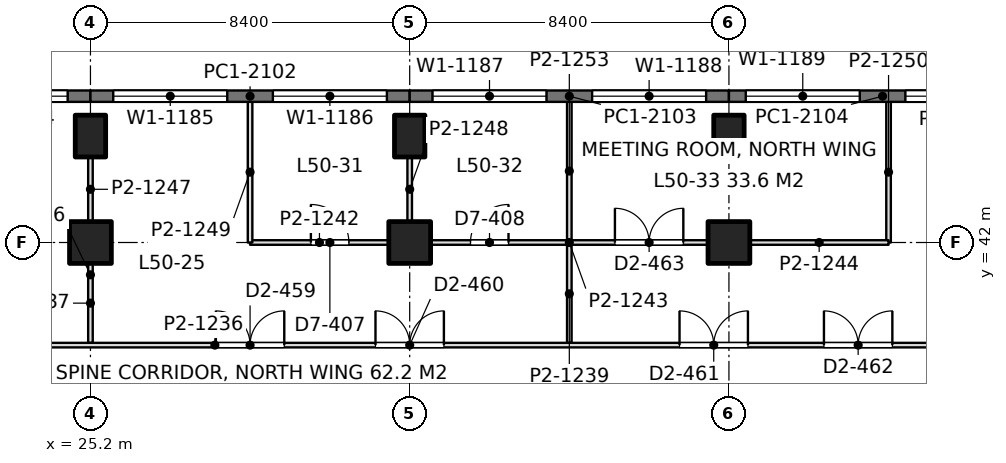
"""IFC4 building model, lengths in metres.
Left out: names, types, materials, properties, quantities, classifications, styles, units other than length and angle.
Written with IfcOpenShell. Run it as: python <this file> out.ifc"""

import sys

from ifc_helpers import new_model, si_unit, direction, frame, frame_2d, origin, origin_2d, place, context, subcontext, project, spatial, rectangle, extrude, element, fill, save


model = new_model("IFC4")
c1 = context("Model", 3, precision=1e-05, world=origin(), true_north=direction((0.0, 1.0)))
c2 = subcontext(c1, "Body", "Model", "MODEL_VIEW")
j1 = project(units=[si_unit("LENGTHUNIT", "METRE"), si_unit("PLANEANGLEUNIT", "RADIAN")], contexts=[c1])
p1 = place(None, origin())
s1 = spatial("IfcSite", under=j1, at=p1, CompositionType="ELEMENT")
p2 = place(p1, origin())
s2 = spatial("IfcBuilding", under=s1, at=p2, CompositionType="ELEMENT")
p3 = place(p2, frame((0.0, 0.0, 219.6)))
s3 = spatial("IfcBuildingStorey", under=s2, at=p3, CompositionType="ELEMENT", Elevation=219.6)
p4 = place(p3, frame((25.2, 42.0, 0.0), z_axis=(0.0, 0.0, 1.0), x_axis=(1.0, 0.0, 0.0)))
e1 = element("IfcColumn", 1, at=p4, inside=s3, PredefinedType="COLUMN", context=c2, shape_type="SweptSolid", body=[
    extrude(rectangle(XDim=1.1, YDim=1.1, at=origin_2d()), origin(), (0.0, 0.0, 1.0), 4.2),
])
p5 = place(p3, frame((25.2, 44.8, 0.0), z_axis=(0.0, 0.0, 1.0), x_axis=(1.0, 0.0, 0.0)))
e2 = element("IfcColumn", 2, at=p5, inside=s3, PredefinedType="COLUMN", context=c2, shape_type="SweptSolid", body=[
    extrude(rectangle(XDim=0.8, YDim=1.1, at=origin_2d()), origin(), (0.0, 0.0, 1.0), 4.2),
])
p6 = place(p3, frame((33.6, 42.0, 0.0), z_axis=(0.0, 0.0, 1.0), x_axis=(1.0, 0.0, 0.0)))
e3 = element("IfcColumn", 3, at=p6, inside=s3, PredefinedType="COLUMN", context=c2, shape_type="SweptSolid", body=[
    extrude(rectangle(XDim=1.1, YDim=1.1, at=origin_2d()), origin(), (0.0, 0.0, 1.0), 4.2),
])
p7 = place(p3, frame((33.6, 44.8, 0.0), z_axis=(0.0, 0.0, 1.0), x_axis=(1.0, 0.0, 0.0)))
e4 = element("IfcColumn", 4, at=p7, inside=s3, PredefinedType="COLUMN", context=c2, shape_type="SweptSolid", body=[
    extrude(rectangle(XDim=0.8, YDim=1.1, at=origin_2d()), origin(), (0.0, 0.0, 1.0), 4.2),
])
p8 = place(p3, frame((42.0, 42.0, 0.0), z_axis=(0.0, 0.0, 1.0), x_axis=(1.0, 0.0, 0.0)))
e5 = element("IfcColumn", 5, at=p8, inside=s3, PredefinedType="COLUMN", context=c2, shape_type="SweptSolid", body=[
    extrude(rectangle(XDim=1.1, YDim=1.1, at=origin_2d()), origin(), (0.0, 0.0, 1.0), 4.2),
])
p9 = place(p3, frame((42.0, 44.8, 0.0), z_axis=(0.0, 0.0, 1.0), x_axis=(1.0, 0.0, 0.0)))
e6 = element("IfcColumn", 6, at=p9, inside=s3, PredefinedType="COLUMN", context=c2, shape_type="SweptSolid", body=[
    extrude(rectangle(XDim=0.8, YDim=1.1, at=origin_2d()), origin(), (0.0, 0.0, 1.0), 4.2),
])
p10 = place(p3, frame((16.8, 45.85, 0.0), z_axis=(0.0, 0.0, 1.0), x_axis=(1.0, 0.0, 0.0)))
e7 = element("IfcWall", 7, at=p10, inside=s3, PredefinedType="SOLIDWALL", context=c2, shape_type="SweptSolid", body=[
    extrude(rectangle(XDim=8.4, YDim=0.3, at=frame_2d((4.2, 0.0))), origin(), (0.0, 0.0, 1.0), 4.05),
])
p11 = place(p10, frame((0.6, 0.0, 0.9)))
e8 = element("IfcOpeningElement", 8, at=p11, cuts=e7, PredefinedType="OPENING", context=c2, shape_type="SweptSolid", body=[
    extrude(rectangle(XDim=3.0, YDim=1.9, at=frame_2d((1.5, 0.95))), frame((0.0, 0.16, 0.0), z_axis=(0.0, -1.0, 0.0), x_axis=(1.0, 0.0, 0.0)), (0.0, 0.0, 1.0), 0.32),
])
p12 = place(p10, frame((4.8, 0.0, 0.9)))
e9 = element("IfcOpeningElement", 9, at=p12, cuts=e7, PredefinedType="OPENING", context=c2, shape_type="SweptSolid", body=[
    extrude(rectangle(XDim=3.0, YDim=1.9, at=frame_2d((1.5, 0.95))), frame((0.0, 0.16, 0.0), z_axis=(0.0, -1.0, 0.0), x_axis=(1.0, 0.0, 0.0)), (0.0, 0.0, 1.0), 0.32),
])
p13 = place(p3, frame((25.2, 45.85, 0.0), z_axis=(0.0, 0.0, 1.0), x_axis=(1.0, 0.0, 0.0)))
e10 = element("IfcWall", 10, at=p13, inside=s3, PredefinedType="SOLIDWALL", context=c2, shape_type="SweptSolid", body=[
    extrude(rectangle(XDim=8.4, YDim=0.3, at=frame_2d((4.2, 0.0))), origin(), (0.0, 0.0, 1.0), 4.05),
])
p14 = place(p13, frame((0.6, 0.0, 0.9)))
e11 = element("IfcOpeningElement", 11, at=p14, cuts=e10, PredefinedType="OPENING", context=c2, shape_type="SweptSolid", body=[
    extrude(rectangle(XDim=3.0, YDim=1.9, at=frame_2d((1.5, 0.95))), frame((0.0, 0.16, 0.0), z_axis=(0.0, -1.0, 0.0), x_axis=(1.0, 0.0, 0.0)), (0.0, 0.0, 1.0), 0.32),
])
p15 = place(p13, frame((4.8, 0.0, 0.9)))
e12 = element("IfcOpeningElement", 12, at=p15, cuts=e10, PredefinedType="OPENING", context=c2, shape_type="SweptSolid", body=[
    extrude(rectangle(XDim=3.0, YDim=1.9, at=frame_2d((1.5, 0.95))), frame((0.0, 0.16, 0.0), z_axis=(0.0, -1.0, 0.0), x_axis=(1.0, 0.0, 0.0)), (0.0, 0.0, 1.0), 0.32),
])
p16 = place(p3, frame((33.6, 45.85, 0.0), z_axis=(0.0, 0.0, 1.0), x_axis=(1.0, 0.0, 0.0)))
e13 = element("IfcWall", 13, at=p16, inside=s3, PredefinedType="SOLIDWALL", context=c2, shape_type="SweptSolid", body=[
    extrude(rectangle(XDim=8.4, YDim=0.3, at=frame_2d((4.2, 0.0))), origin(), (0.0, 0.0, 1.0), 4.05),
])
p17 = place(p16, frame((0.6, 0.0, 0.9)))
e14 = element("IfcOpeningElement", 14, at=p17, cuts=e13, PredefinedType="OPENING", context=c2, shape_type="SweptSolid", body=[
    extrude(rectangle(XDim=3.0, YDim=1.9, at=frame_2d((1.5, 0.95))), frame((0.0, 0.16, 0.0), z_axis=(0.0, -1.0, 0.0), x_axis=(1.0, 0.0, 0.0)), (0.0, 0.0, 1.0), 0.32),
])
p18 = place(p16, frame((4.8, 0.0, 0.9)))
e15 = element("IfcOpeningElement", 15, at=p18, cuts=e13, PredefinedType="OPENING", context=c2, shape_type="SweptSolid", body=[
    extrude(rectangle(XDim=3.0, YDim=1.9, at=frame_2d((1.5, 0.95))), frame((0.0, 0.16, 0.0), z_axis=(0.0, -1.0, 0.0), x_axis=(1.0, 0.0, 0.0)), (0.0, 0.0, 1.0), 0.32),
])
p19 = place(p3, frame((42.0, 45.85, 0.0), z_axis=(0.0, 0.0, 1.0), x_axis=(1.0, 0.0, 0.0)))
e16 = element("IfcWall", 16, at=p19, inside=s3, PredefinedType="SOLIDWALL", context=c2, shape_type="SweptSolid", body=[
    extrude(rectangle(XDim=8.085, YDim=0.3, at=frame_2d((4.042, 0.0))), origin(), (0.0, 0.0, 1.0), 4.05),
])
p20 = place(p19, frame((0.443, 0.0, 0.9)))
e17 = element("IfcOpeningElement", 17, at=p20, cuts=e16, PredefinedType="OPENING", context=c2, shape_type="SweptSolid", body=[
    extrude(rectangle(XDim=3.0, YDim=1.9, at=frame_2d((1.5, 0.95))), frame((0.0, 0.16, 0.0), z_axis=(0.0, -1.0, 0.0), x_axis=(1.0, 0.0, 0.0)), (0.0, 0.0, 1.0), 0.32),
])
p21 = place(p19, frame((4.643, 0.0, 0.9)))
e18 = element("IfcOpeningElement", 18, at=p21, cuts=e16, PredefinedType="OPENING", context=c2, shape_type="SweptSolid", body=[
    extrude(rectangle(XDim=3.0, YDim=1.9, at=frame_2d((1.5, 0.95))), frame((0.0, 0.16, 0.0), z_axis=(0.0, -1.0, 0.0), x_axis=(1.0, 0.0, 0.0)), (0.0, 0.0, 1.0), 0.32),
])
p22 = place(p3, frame((29.4, 42.0, 0.0), z_axis=(0.0, 0.0, 1.0), x_axis=(1.0, 0.0, 0.0)))
e19 = element("IfcWall", 19, at=p22, inside=s3, PredefinedType="PARTITIONING", context=c2, shape_type="SweptSolid", body=[
    extrude(rectangle(XDim=3.651, YDim=0.12, at=frame_2d((1.826, 0.0))), origin(), (0.0, 0.0, 1.0), 3.55),
])
p23 = place(p22, frame((1.6, 0.0, 0.0)))
e20 = element("IfcOpeningElement", 20, at=p23, cuts=e19, PredefinedType="OPENING", context=c2, shape_type="SweptSolid", body=[
    extrude(rectangle(XDim=1.0, YDim=2.4, at=frame_2d((0.5, 1.2))), frame((0.0, 0.07, 0.0), z_axis=(0.0, -1.0, 0.0), x_axis=(1.0, 0.0, 0.0)), (0.0, 0.0, 1.0), 0.14),
])
p24 = place(p3, frame((34.149, 42.0, 0.0), z_axis=(0.0, 0.0, 1.0), x_axis=(1.0, 0.0, 0.0)))
e21 = element("IfcWall", 21, at=p24, inside=s3, PredefinedType="PARTITIONING", context=c2, shape_type="SweptSolid", body=[
    extrude(rectangle(XDim=7.302, YDim=0.12, at=frame_2d((3.651, 0.0))), origin(), (0.0, 0.0, 1.0), 3.55),
])
p25 = place(p24, frame((1.051, 0.0, 0.0)))
e22 = element("IfcOpeningElement", 22, at=p25, cuts=e21, PredefinedType="OPENING", context=c2, shape_type="SweptSolid", body=[
    extrude(rectangle(XDim=1.0, YDim=2.4, at=frame_2d((0.5, 1.2))), frame((0.0, 0.07, 0.0), z_axis=(0.0, -1.0, 0.0), x_axis=(1.0, 0.0, 0.0)), (0.0, 0.0, 1.0), 0.14),
])
p26 = place(p24, frame((4.851, 0.0, 0.0)))
e23 = element("IfcOpeningElement", 23, at=p26, cuts=e21, PredefinedType="OPENING", context=c2, shape_type="SweptSolid", body=[
    extrude(rectangle(XDim=1.8, YDim=2.2, at=frame_2d((0.9, 1.1))), frame((0.0, 0.07, 0.0), z_axis=(0.0, -1.0, 0.0), x_axis=(1.0, 0.0, 0.0)), (0.0, 0.0, 1.0), 0.14),
])
p27 = place(p3, frame((42.549, 42.0, 0.0), z_axis=(0.0, 0.0, 1.0), x_axis=(1.0, 0.0, 0.0)))
e24 = element("IfcWall", 24, at=p27, inside=s3, PredefinedType="PARTITIONING", context=c2, shape_type="SweptSolid", body=[
    extrude(rectangle(XDim=3.651, YDim=0.12, at=frame_2d((1.825, 0.0))), origin(), (0.0, 0.0, 1.0), 3.55),
])
p28 = place(p3, frame((29.4, 42.0, 0.0), z_axis=(0.0, 0.0, 1.0), x_axis=(0.0, 1.0, 0.0)))
e25 = element("IfcWall", 25, at=p28, inside=s3, PredefinedType="PARTITIONING", context=c2, shape_type="SweptSolid", body=[
    extrude(rectangle(XDim=3.702, YDim=0.12, at=frame_2d((1.851, 0.0))), origin(), (0.0, 0.0, 1.0), 3.55),
])
p29 = place(p3, frame((33.6, 42.549, 0.0), z_axis=(0.0, 0.0, 1.0), x_axis=(0.0, 1.0, 0.0)))
e26 = element("IfcWall", 26, at=p29, inside=s3, PredefinedType="PARTITIONING", context=c2, shape_type="SweptSolid", body=[
    extrude(rectangle(XDim=1.702, YDim=0.12, at=frame_2d((0.851, 0.0))), origin(), (0.0, 0.0, 1.0), 3.69),
])
p30 = place(p3, frame((37.8, 42.058, 0.0), z_axis=(0.0, 0.0, 1.0), x_axis=(0.0, 1.0, 0.0)))
e27 = element("IfcWall", 27, at=p30, inside=s3, PredefinedType="PARTITIONING", context=c2, shape_type="SweptSolid", body=[
    extrude(rectangle(XDim=3.644, YDim=0.12, at=frame_2d((1.822, 0.0))), origin(), (0.0, 0.0, 1.0), 3.55),
])
p31 = place(p3, frame((46.2, 42.0, 0.0), z_axis=(0.0, 0.0, 1.0), x_axis=(0.0, 1.0, 0.0)))
e28 = element("IfcWall", 28, at=p31, inside=s3, PredefinedType="PARTITIONING", context=c2, shape_type="SweptSolid", body=[
    extrude(rectangle(XDim=3.702, YDim=0.12, at=frame_2d((1.851, 0.0))), origin(), (0.0, 0.0, 1.0), 3.55),
])
p32 = place(p3, frame((25.2, 39.358, 0.0), z_axis=(0.0, 0.0, 1.0), x_axis=(0.0, 1.0, 0.0)))
e29 = element("IfcWall", 29, at=p32, inside=s3, PredefinedType="PARTITIONING", context=c2, shape_type="SweptSolid", body=[
    extrude(rectangle(XDim=2.093, YDim=0.12, at=frame_2d((1.046, 0.0))), origin(), (0.0, 0.0, 1.0), 3.55),
])
p33 = place(p3, frame((25.2, 42.549, 0.0), z_axis=(0.0, 0.0, 1.0), x_axis=(0.0, 1.0, 0.0)))
e30 = element("IfcWall", 30, at=p33, inside=s3, PredefinedType="PARTITIONING", context=c2, shape_type="SweptSolid", body=[
    extrude(rectangle(XDim=1.702, YDim=0.12, at=frame_2d((0.851, 0.0))), origin(), (0.0, 0.0, 1.0), 3.69),
])
p34 = place(p3, frame((37.8, 39.358, 0.0), z_axis=(0.0, 0.0, 1.0), x_axis=(0.0, 1.0, 0.0)))
e31 = element("IfcWall", 31, at=p34, inside=s3, PredefinedType="PARTITIONING", context=c2, shape_type="SweptSolid", body=[
    extrude(rectangle(XDim=2.584, YDim=0.12, at=frame_2d((1.292, 0.0))), origin(), (0.0, 0.0, 1.0), 3.55),
])
p35 = place(p3, frame((7.748, 39.3, 0.0), z_axis=(0.0, 0.0, 1.0), x_axis=(1.0, 0.0, 0.0)))
e32 = element("IfcWall", 32, at=p35, inside=s3, PredefinedType="PARTITIONING", context=c2, shape_type="SweptSolid", body=[
    extrude(rectangle(XDim=41.452, YDim=0.12, at=frame_2d((20.726, 0.0))), origin(), (0.0, 0.0, 1.0), 3.55),
])
p36 = place(p35, frame((1.527, 0.0, 0.0)))
e33 = element("IfcOpeningElement", 33, at=p36, cuts=e32, PredefinedType="OPENING", context=c2, shape_type="SweptSolid", body=[
    extrude(rectangle(XDim=1.8, YDim=2.2, at=frame_2d((0.9, 1.1))), frame((0.0, 0.07, 0.0), z_axis=(0.0, -1.0, 0.0), x_axis=(1.0, 0.0, 0.0)), (0.0, 0.0, 1.0), 0.14),
])
p37 = place(p35, frame((8.152, 0.0, 0.0)))
e34 = element("IfcOpeningElement", 34, at=p37, cuts=e32, PredefinedType="OPENING", context=c2, shape_type="SweptSolid", body=[
    extrude(rectangle(XDim=1.8, YDim=2.2, at=frame_2d((0.9, 1.1))), frame((0.0, 0.07, 0.0), z_axis=(0.0, -1.0, 0.0), x_axis=(1.0, 0.0, 0.0)), (0.0, 0.0, 1.0), 0.14),
])
p38 = place(p35, frame((12.352, 0.0, 0.0)))
e35 = element("IfcOpeningElement", 35, at=p38, cuts=e32, PredefinedType="OPENING", context=c2, shape_type="SweptSolid", body=[
    extrude(rectangle(XDim=1.8, YDim=2.2, at=frame_2d((0.9, 1.1))), frame((0.0, 0.07, 0.0), z_axis=(0.0, -1.0, 0.0), x_axis=(1.0, 0.0, 0.0)), (0.0, 0.0, 1.0), 0.14),
])
p39 = place(p35, frame((20.752, 0.0, 0.0)))
e36 = element("IfcOpeningElement", 36, at=p39, cuts=e32, PredefinedType="OPENING", context=c2, shape_type="SweptSolid", body=[
    extrude(rectangle(XDim=1.8, YDim=2.2, at=frame_2d((0.9, 1.1))), frame((0.0, 0.07, 0.0), z_axis=(0.0, -1.0, 0.0), x_axis=(1.0, 0.0, 0.0)), (0.0, 0.0, 1.0), 0.14),
])
p40 = place(p35, frame((24.952, 0.0, 0.0)))
e37 = element("IfcOpeningElement", 37, at=p40, cuts=e32, PredefinedType="OPENING", context=c2, shape_type="SweptSolid", body=[
    extrude(rectangle(XDim=1.8, YDim=2.2, at=frame_2d((0.9, 1.1))), frame((0.0, 0.07, 0.0), z_axis=(0.0, -1.0, 0.0), x_axis=(1.0, 0.0, 0.0)), (0.0, 0.0, 1.0), 0.14),
])
p41 = place(p35, frame((32.952, 0.0, 0.0)))
e38 = element("IfcOpeningElement", 38, at=p41, cuts=e32, PredefinedType="OPENING", context=c2, shape_type="SweptSolid", body=[
    extrude(rectangle(XDim=1.8, YDim=2.2, at=frame_2d((0.9, 1.1))), frame((0.0, 0.07, 0.0), z_axis=(0.0, -1.0, 0.0), x_axis=(1.0, 0.0, 0.0)), (0.0, 0.0, 1.0), 0.14),
])
p42 = place(p35, frame((36.752, 0.0, 0.0)))
e39 = element("IfcOpeningElement", 39, at=p42, cuts=e32, PredefinedType="OPENING", context=c2, shape_type="SweptSolid", body=[
    extrude(rectangle(XDim=1.8, YDim=2.2, at=frame_2d((0.9, 1.1))), frame((0.0, 0.07, 0.0), z_axis=(0.0, -1.0, 0.0), x_axis=(1.0, 0.0, 0.0)), (0.0, 0.0, 1.0), 0.14),
])
p43 = place(p12, origin())
e40 = element("IfcWindow", 40, at=p43, inside=s3, PartitioningType="SINGLE_PANEL", PredefinedType="WINDOW", context=c2, shape_type="SweptSolid", body=[
    extrude(rectangle(XDim=3.0, YDim=1.9, at=frame_2d((1.5, 0.95))), frame((0.0, 0.03, 0.0), z_axis=(0.0, -1.0, 0.0), x_axis=(1.0, 0.0, 0.0)), (0.0, 0.0, 1.0), 0.06),
])
fill(e9, e40)
p44 = place(p14, origin())
e41 = element("IfcWindow", 41, at=p44, inside=s3, PartitioningType="SINGLE_PANEL", PredefinedType="WINDOW", context=c2, shape_type="SweptSolid", body=[
    extrude(rectangle(XDim=3.0, YDim=1.9, at=frame_2d((1.5, 0.95))), frame((0.0, 0.03, 0.0), z_axis=(0.0, -1.0, 0.0), x_axis=(1.0, 0.0, 0.0)), (0.0, 0.0, 1.0), 0.06),
])
fill(e11, e41)
p45 = place(p15, origin())
e42 = element("IfcWindow", 42, at=p45, inside=s3, PartitioningType="SINGLE_PANEL", PredefinedType="WINDOW", context=c2, shape_type="SweptSolid", body=[
    extrude(rectangle(XDim=3.0, YDim=1.9, at=frame_2d((1.5, 0.95))), frame((0.0, 0.03, 0.0), z_axis=(0.0, -1.0, 0.0), x_axis=(1.0, 0.0, 0.0)), (0.0, 0.0, 1.0), 0.06),
])
fill(e12, e42)
p46 = place(p17, origin())
e43 = element("IfcWindow", 43, at=p46, inside=s3, PartitioningType="SINGLE_PANEL", PredefinedType="WINDOW", context=c2, shape_type="SweptSolid", body=[
    extrude(rectangle(XDim=3.0, YDim=1.9, at=frame_2d((1.5, 0.95))), frame((0.0, 0.03, 0.0), z_axis=(0.0, -1.0, 0.0), x_axis=(1.0, 0.0, 0.0)), (0.0, 0.0, 1.0), 0.06),
])
fill(e14, e43)
p47 = place(p18, origin())
e44 = element("IfcWindow", 44, at=p47, inside=s3, PartitioningType="SINGLE_PANEL", PredefinedType="WINDOW", context=c2, shape_type="SweptSolid", body=[
    extrude(rectangle(XDim=3.0, YDim=1.9, at=frame_2d((1.5, 0.95))), frame((0.0, 0.03, 0.0), z_axis=(0.0, -1.0, 0.0), x_axis=(1.0, 0.0, 0.0)), (0.0, 0.0, 1.0), 0.06),
])
fill(e15, e44)
p48 = place(p20, origin())
e45 = element("IfcWindow", 45, at=p48, inside=s3, PartitioningType="SINGLE_PANEL", PredefinedType="WINDOW", context=c2, shape_type="SweptSolid", body=[
    extrude(rectangle(XDim=3.0, YDim=1.9, at=frame_2d((1.5, 0.95))), frame((0.0, 0.03, 0.0), z_axis=(0.0, -1.0, 0.0), x_axis=(1.0, 0.0, 0.0)), (0.0, 0.0, 1.0), 0.06),
])
fill(e17, e45)
p49 = place(p21, origin())
e46 = element("IfcWindow", 46, at=p49, inside=s3, PartitioningType="SINGLE_PANEL", PredefinedType="WINDOW", context=c2, shape_type="SweptSolid", body=[
    extrude(rectangle(XDim=3.0, YDim=1.9, at=frame_2d((1.5, 0.95))), frame((0.0, 0.03, 0.0), z_axis=(0.0, -1.0, 0.0), x_axis=(1.0, 0.0, 0.0)), (0.0, 0.0, 1.0), 0.06),
])
fill(e18, e46)
p50 = place(p23, origin())
e47 = element("IfcDoor", 47, at=p50, inside=s3, OperationType="SINGLE_SWING_LEFT", PredefinedType="DOOR", context=c2, shape_type="SweptSolid", body=[
    extrude(rectangle(XDim=1.0, YDim=2.4, at=frame_2d((0.5, 1.2))), frame((0.0, 0.025, 0.0), z_axis=(0.0, -1.0, 0.0), x_axis=(1.0, 0.0, 0.0)), (0.0, 0.0, 1.0), 0.05),
])
fill(e20, e47)
p51 = place(p25, origin())
e48 = element("IfcDoor", 48, at=p51, inside=s3, OperationType="SINGLE_SWING_RIGHT", PredefinedType="DOOR", context=c2, shape_type="SweptSolid", body=[
    extrude(rectangle(XDim=1.0, YDim=2.4, at=frame_2d((0.5, 1.2))), frame((0.0, 0.025, 0.0), z_axis=(0.0, -1.0, 0.0), x_axis=(1.0, 0.0, 0.0)), (0.0, 0.0, 1.0), 0.05),
])
fill(e22, e48)
p52 = place(p26, origin())
e49 = element("IfcDoor", 49, at=p52, inside=s3, OperationType="DOUBLE_DOOR_SINGLE_SWING", PredefinedType="DOOR", context=c2, shape_type="SweptSolid", body=[
    extrude(rectangle(XDim=1.8, YDim=2.2, at=frame_2d((0.9, 1.1))), frame((0.0, 0.025, 0.0), z_axis=(0.0, -1.0, 0.0), x_axis=(1.0, 0.0, 0.0)), (0.0, 0.0, 1.0), 0.05),
])
fill(e23, e49)
p53 = place(p39, origin())
e50 = element("IfcDoor", 50, at=p53, inside=s3, OperationType="DOUBLE_DOOR_SINGLE_SWING", PredefinedType="DOOR", context=c2, shape_type="SweptSolid", body=[
    extrude(rectangle(XDim=1.8, YDim=2.2, at=frame_2d((0.9, 1.1))), frame((0.0, 0.025, 0.0), z_axis=(0.0, -1.0, 0.0), x_axis=(1.0, 0.0, 0.0)), (0.0, 0.0, 1.0), 0.05),
])
fill(e36, e50)
p54 = place(p40, origin())
e51 = element("IfcDoor", 51, at=p54, inside=s3, OperationType="DOUBLE_DOOR_SINGLE_SWING", PredefinedType="DOOR", context=c2, shape_type="SweptSolid", body=[
    extrude(rectangle(XDim=1.8, YDim=2.2, at=frame_2d((0.9, 1.1))), frame((0.0, 0.025, 0.0), z_axis=(0.0, -1.0, 0.0), x_axis=(1.0, 0.0, 0.0)), (0.0, 0.0, 1.0), 0.05),
])
fill(e37, e51)
p55 = place(p41, origin())
e52 = element("IfcDoor", 52, at=p55, inside=s3, OperationType="DOUBLE_DOOR_SINGLE_SWING", PredefinedType="DOOR", context=c2, shape_type="SweptSolid", body=[
    extrude(rectangle(XDim=1.8, YDim=2.2, at=frame_2d((0.9, 1.1))), frame((0.0, 0.025, 0.0), z_axis=(0.0, -1.0, 0.0), x_axis=(1.0, 0.0, 0.0)), (0.0, 0.0, 1.0), 0.05),
])
fill(e38, e52)
p56 = place(p42, origin())
e53 = element("IfcDoor", 53, at=p56, inside=s3, OperationType="DOUBLE_DOOR_SINGLE_SWING", PredefinedType="DOOR", context=c2, shape_type="SweptSolid", body=[
    extrude(rectangle(XDim=1.8, YDim=2.2, at=frame_2d((0.9, 1.1))), frame((0.0, 0.025, 0.0), z_axis=(0.0, -1.0, 0.0), x_axis=(1.0, 0.0, 0.0)), (0.0, 0.0, 1.0), 0.05),
])
fill(e39, e53)
save(model, sys.argv[1])
